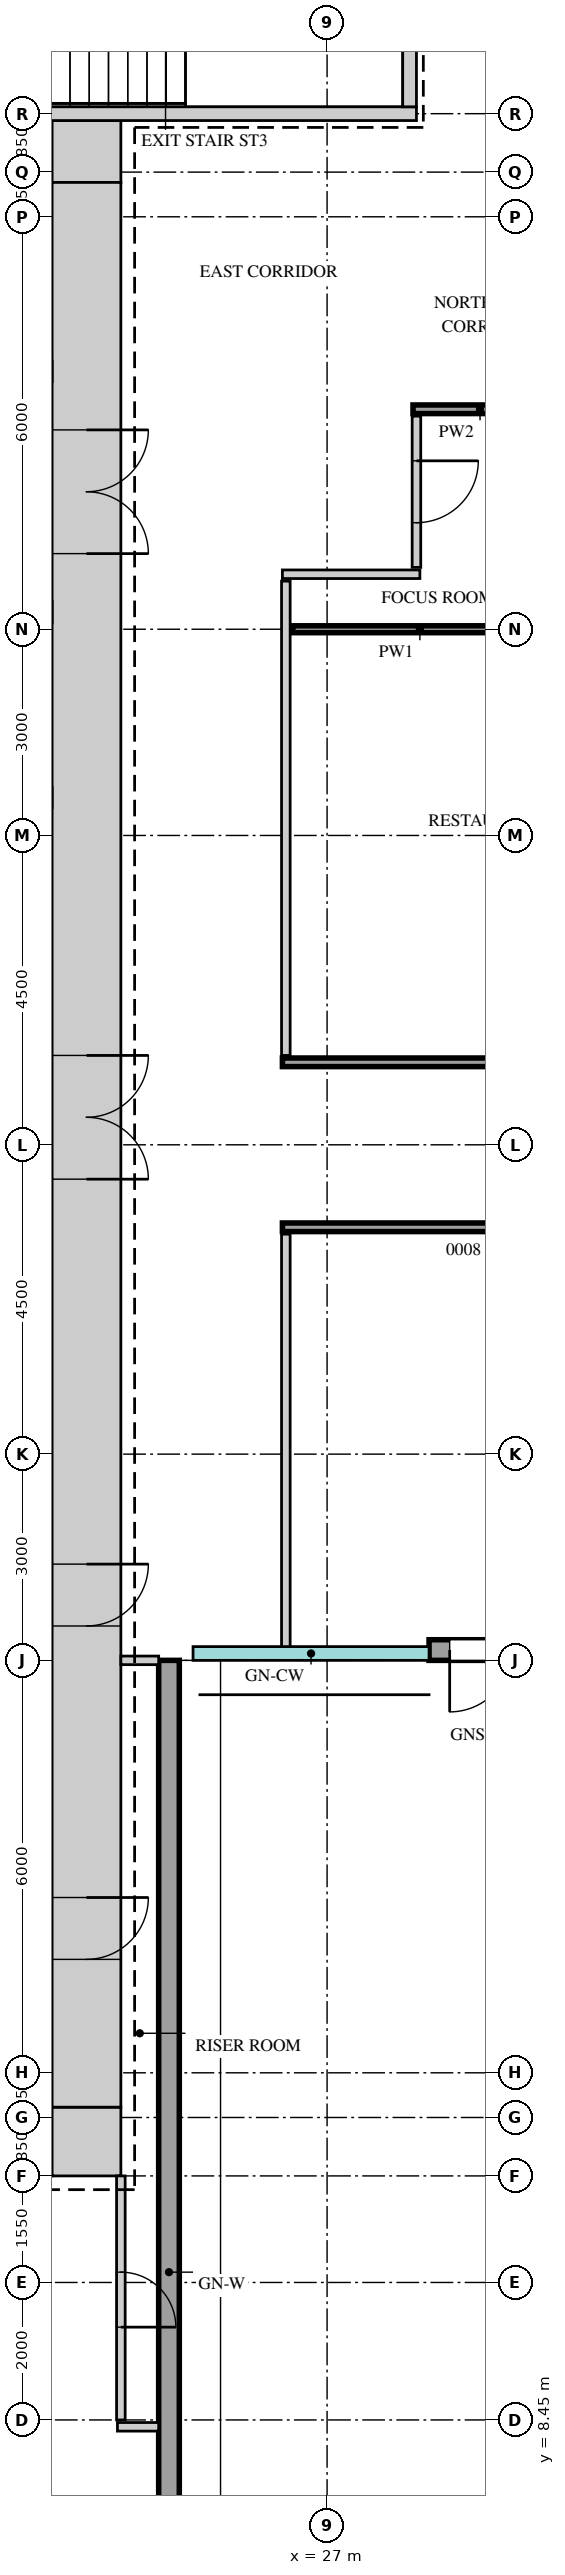
"""IFC4 building model, lengths in metres.
Left out: names, types, materials, properties, quantities, classifications, styles, units other than length and angle.
Written with IfcOpenShell. Run it as: python <this file> out.ifc"""

import sys

from ifc_helpers import new_model, si_unit, direction, frame, frame_2d, origin, place, context, subcontext, project, spatial, rectangle, extrude, source, transform, mapped, element, fill, save


model = new_model("IFC4")
c1 = context("Model", 3, precision=1e-05, world=origin(), true_north=direction((0.0, 1.0)))
c2 = subcontext(c1, "Body", "Model", "MODEL_VIEW")
j1 = project(units=[si_unit("LENGTHUNIT", "METRE"), si_unit("PLANEANGLEUNIT", "RADIAN")], contexts=[c1])
p1 = place(None, origin())
s1 = spatial("IfcSite", under=j1, at=p1, CompositionType="ELEMENT")
p2 = place(p1, origin())
s2 = spatial("IfcBuilding", under=s1, at=p2, CompositionType="ELEMENT")
p3 = place(p2, frame((0.0, 0.0, 158.7)))
s3 = spatial("IfcBuildingStorey", under=s2, at=p3, CompositionType="ELEMENT", Elevation=158.7)
m1 = source(origin(), c2, "Body", "SweptSolid", [
    extrude(rectangle(XDim=1.0, YDim=0.9, at=frame_2d((0.5, 0.0))), origin(), (0.0, 0.0, 1.0), 5.75),
])
p4 = place(p3, frame((23.0, 41.45, 0.0), z_axis=(0.0, 0.0, 1.0), x_axis=(1.0, 0.0, 0.0)))
e1 = element("IfcWall", 1, at=p4, inside=s3, PredefinedType="SHEAR", context=c2, shape_type="MappedRepresentation", body=[
    mapped(m1, transform((0.0, 0.0, 0.0))),
])
m2 = source(origin(), c2, "Body", "SweptSolid", [
    extrude(rectangle(XDim=1.0, YDim=1.0, at=frame_2d((0.5, 0.0))), origin(), (0.0, 0.0, 1.0), 5.75),
])
p5 = place(p3, frame((23.0, 12.5, 0.0), z_axis=(0.0, 0.0, 1.0), x_axis=(1.0, 0.0, 0.0)))
e2 = element("IfcWall", 2, at=p5, inside=s3, PredefinedType="SHEAR", context=c2, shape_type="MappedRepresentation", body=[
    mapped(m2, transform((0.0, 0.0, 0.0))),
])
m3 = source(origin(), c2, "Body", "SweptSolid", [
    extrude(rectangle(XDim=28.0, YDim=1.0, at=frame_2d((14.0, 0.0))), origin(), (0.0, 0.0, 1.0), 5.75),
])
p6 = place(p3, frame((23.5, 13.0, 0.0), z_axis=(0.0, 0.0, 1.0), x_axis=(0.0, 1.0, 0.0)))
e3 = element("IfcWall", 3, at=p6, inside=s3, PredefinedType="SHEAR", context=c2, shape_type="MappedRepresentation", body=[
    mapped(m3, transform((0.0, 0.0, 0.0))),
])
m4 = source(origin(), c2, "Body", "SweptSolid", [
    extrude(rectangle(XDim=1.8, YDim=2.1, at=frame_2d((0.9, 1.05))), frame((0.0, 0.51, 0.0), z_axis=(0.0, -1.0, 0.0), x_axis=(1.0, 0.0, 0.0)), (0.0, 0.0, 1.0), 1.02),
])
p7 = place(p6, frame((13.5, 0.0, 0.0)))
e4 = element("IfcOpeningElement", 4, at=p7, cuts=e3, PredefinedType="OPENING", context=c2, shape_type="MappedRepresentation", body=[
    mapped(m4, transform((0.0, 0.0, 0.0))),
])
p8 = place(p6, frame((22.6, 0.0, 0.0)))
e5 = element("IfcOpeningElement", 5, at=p8, cuts=e3, PredefinedType="OPENING", context=c2, shape_type="MappedRepresentation", body=[
    mapped(m4, transform((0.0, 0.0, 0.0))),
])
m5 = source(origin(), c2, "Body", "SweptSolid", [
    extrude(rectangle(XDim=0.9, YDim=2.1, at=frame_2d((0.45, 1.05))), frame((0.0, 0.51, 0.0), z_axis=(0.0, -1.0, 0.0), x_axis=(1.0, 0.0, 0.0)), (0.0, 0.0, 1.0), 1.02),
])
p9 = place(p6, frame((2.15, 0.0, 0.0)))
e6 = element("IfcOpeningElement", 6, at=p9, cuts=e3, PredefinedType="OPENING", context=c2, shape_type="MappedRepresentation", body=[
    mapped(m5, transform((0.0, 0.0, 0.0))),
])
p10 = place(p6, frame((7.0, 0.0, 0.0)))
e7 = element("IfcOpeningElement", 7, at=p10, cuts=e3, PredefinedType="OPENING", context=c2, shape_type="MappedRepresentation", body=[
    mapped(m5, transform((0.0, 0.0, 0.0))),
])
m6 = source(origin(), c2, "Body", "SweptSolid", [
    extrude(rectangle(XDim=7.1, YDim=0.2, at=frame_2d((3.55, 0.0))), origin(), (0.0, 0.0, 1.0), 5.75),
])
p11 = place(p3, frame((21.2, 42.0, 0.0), z_axis=(0.0, 0.0, 1.0), x_axis=(1.0, 0.0, 0.0)))
e8 = element("IfcWall", 8, at=p11, inside=s3, PredefinedType="SHEAR", context=c2, shape_type="MappedRepresentation", body=[
    mapped(m6, transform((0.0, 0.0, 0.0))),
])
m7 = source(origin(), c2, "Body", "SweptSolid", [
    extrude(rectangle(XDim=3.35, YDim=0.2, at=frame_2d((1.675, 0.0))), origin(), (0.0, 0.0, 1.0), 5.75),
])
p12 = place(p3, frame((28.2, 42.1, 0.0), z_axis=(0.0, 0.0, 1.0), x_axis=(0.0, 1.0, 0.0)))
e9 = element("IfcWall", 9, at=p12, inside=s3, PredefinedType="SHEAR", context=c2, shape_type="MappedRepresentation", body=[
    mapped(m7, transform((0.0, 0.0, 0.0))),
])
m8 = source(origin(), c2, "Body", "SweptSolid", [
    extrude(rectangle(XDim=17.8, YDim=0.3, at=frame_2d((8.9, 0.0))), origin(), (0.0, 0.0, 1.0), 5.55),
])
p13 = place(p3, frame((24.7, 1.7, 0.0), z_axis=(0.0, 0.0, 1.0), x_axis=(0.0, 1.0, 0.0)))
e10 = element("IfcWall", 10, at=p13, inside=s3, PredefinedType="SOLIDWALL", context=c2, shape_type="MappedRepresentation", body=[
    mapped(m8, transform((0.0, 0.0, 0.0))),
])
m9 = source(origin(), c2, "Body", "SweptSolid", [
    extrude(rectangle(XDim=2.4, YDim=0.3, at=frame_2d((1.2, 0.0))), origin(), (0.0, 0.0, 1.0), 5.55),
])
p14 = place(p3, frame((28.483, 19.65, 0.0), z_axis=(0.0, 0.0, 1.0), x_axis=(1.0, 0.0, 0.0)))
e11 = element("IfcWall", 11, at=p14, inside=s3, PredefinedType="SOLIDWALL", context=c2, shape_type="MappedRepresentation", body=[
    mapped(m9, transform((0.0, 0.0, 0.0))),
])
m10 = source(origin(), c2, "Body", "SweptSolid", [
    extrude(rectangle(XDim=1.8, YDim=2.4, at=frame_2d((0.9, 1.2))), frame((0.0, 0.16, 0.0), z_axis=(0.0, -1.0, 0.0), x_axis=(1.0, 0.0, 0.0)), (0.0, 0.0, 1.0), 0.32),
])
p15 = place(p14, frame((2.1, 0.0, 0.0), z_axis=(0.0, 0.0, 1.0), x_axis=(-1.0, 0.0, 0.0)))
e12 = element("IfcOpeningElement", 12, at=p15, cuts=e11, PredefinedType="OPENING", context=c2, shape_type="MappedRepresentation", body=[
    mapped(m10, transform((0.0, 0.0, 0.0))),
])
m11 = source(origin(), c2, "Body", "SweptSolid", [
    extrude(rectangle(XDim=0.6, YDim=0.125, at=frame_2d((0.3, 0.0))), origin(), (0.0, 0.0, 1.0), 5.75),
])
p16 = place(p3, frame((23.95, 8.35, 0.0), z_axis=(0.0, 0.0, 1.0), x_axis=(1.0, 0.0, 0.0)))
e13 = element("IfcWall", 13, at=p16, inside=s3, PredefinedType="PARTITIONING", context=c2, shape_type="MappedRepresentation", body=[
    mapped(m11, transform((0.0, 0.0, 0.0))),
])
m12 = source(origin(), c2, "Body", "SweptSolid", [
    extrude(rectangle(XDim=3.55, YDim=0.125, at=frame_2d((1.775, 0.0))), origin(), (0.0, 0.0, 1.0), 5.75),
])
p17 = place(p3, frame((24.0, 8.45, 0.0), z_axis=(0.0, 0.0, 1.0), x_axis=(0.0, 1.0, 0.0)))
e14 = element("IfcWall", 14, at=p17, inside=s3, PredefinedType="PARTITIONING", context=c2, shape_type="MappedRepresentation", body=[
    mapped(m12, transform((0.0, 0.0, 0.0))),
])
m13 = source(origin(), c2, "Body", "SweptSolid", [
    extrude(rectangle(XDim=0.8, YDim=2.1, at=frame_2d((0.4, 1.05))), frame((0.0, 0.073, 0.0), z_axis=(0.0, -1.0, 0.0), x_axis=(1.0, 0.0, 0.0)), (0.0, 0.0, 1.0), 0.145),
])
p18 = place(p17, frame((1.35, 0.0, 0.0)))
e15 = element("IfcOpeningElement", 15, at=p18, cuts=e14, PredefinedType="OPENING", context=c2, shape_type="MappedRepresentation", body=[
    mapped(m13, transform((0.0, 0.0, 0.0))),
])
m14 = source(origin(), c2, "Body", "SweptSolid", [
    extrude(rectangle(XDim=0.55, YDim=0.125, at=frame_2d((0.275, 0.0))), origin(), (0.0, 0.0, 1.0), 5.75),
])
p19 = place(p3, frame((24.0, 19.5, 0.0), z_axis=(0.0, 0.0, 1.0), x_axis=(1.0, 0.0, 0.0)))
e16 = element("IfcWall", 16, at=p19, inside=s3, PredefinedType="PARTITIONING", context=c2, shape_type="MappedRepresentation", body=[
    mapped(m14, transform((0.0, 0.0, 0.0))),
])
m15 = source(origin(), c2, "Body", "SweptSolid", [
    extrude(rectangle(XDim=6.05, YDim=0.125, at=frame_2d((3.025, 0.0))), origin(), (0.0, 0.0, 1.0), 5.75),
])
p20 = place(p3, frame((26.4, 19.65, 0.0), z_axis=(0.0, 0.0, 1.0), x_axis=(0.0, 1.0, 0.0)))
e17 = element("IfcWall", 17, at=p20, inside=s3, PredefinedType="PARTITIONING", context=c2, shape_type="MappedRepresentation", body=[
    mapped(m15, transform((0.0, 0.0, 0.0))),
])
m16 = source(origin(), c2, "Body", "SweptSolid", [
    extrude(rectangle(XDim=26.0, YDim=0.125, at=frame_2d((13.0, 0.0))), origin(), (0.0, 0.0, 1.0), 5.75),
])
p21 = place(p3, frame((26.35, 25.8, 0.0), z_axis=(0.0, 0.0, 1.0), x_axis=(1.0, 0.0, 0.0)))
e18 = element("IfcWall", 18, at=p21, inside=s3, PredefinedType="PARTITIONING", context=c2, shape_type="MappedRepresentation", body=[
    mapped(m16, transform((0.0, 0.0, 0.0))),
])
m17 = source(origin(), c2, "Body", "SweptSolid", [
    extrude(rectangle(XDim=1.2, YDim=2.1, at=frame_2d((0.6, 1.05))), frame((0.0, 0.073, 0.0), z_axis=(0.0, -1.0, 0.0), x_axis=(1.0, 0.0, 0.0)), (0.0, 0.0, 1.0), 0.145),
])
p22 = place(p21, frame((15.75, 0.0, 0.0)))
e19 = element("IfcOpeningElement", 19, at=p22, cuts=e18, PredefinedType="OPENING", context=c2, shape_type="MappedRepresentation", body=[
    mapped(m17, transform((0.0, 0.0, 0.0))),
])
p23 = place(p21, frame((22.3, 0.0, 0.0)))
e20 = element("IfcOpeningElement", 20, at=p23, cuts=e18, PredefinedType="OPENING", context=c2, shape_type="MappedRepresentation", body=[
    mapped(m17, transform((0.0, 0.0, 0.0))),
])
m18 = source(origin(), c2, "Body", "SweptSolid", [
    extrude(rectangle(XDim=0.9, YDim=2.1, at=frame_2d((0.45, 1.05))), frame((0.0, 0.073, 0.0), z_axis=(0.0, -1.0, 0.0), x_axis=(1.0, 0.0, 0.0)), (0.0, 0.0, 1.0), 0.145),
])
p24 = place(p21, frame((3.05, 0.0, 0.0)))
e21 = element("IfcOpeningElement", 21, at=p24, cuts=e18, PredefinedType="OPENING", context=c2, shape_type="MappedRepresentation", body=[
    mapped(m18, transform((0.0, 0.0, 0.0))),
])
p25 = place(p21, frame((9.4, 0.0, 0.0)))
e22 = element("IfcOpeningElement", 22, at=p25, cuts=e18, PredefinedType="OPENING", context=c2, shape_type="MappedRepresentation", body=[
    mapped(m18, transform((0.0, 0.0, 0.0))),
])
p26 = place(p3, frame((26.35, 28.2, 0.0), z_axis=(0.0, 0.0, 1.0), x_axis=(1.0, 0.0, 0.0)))
e23 = element("IfcWall", 23, at=p26, inside=s3, PredefinedType="PARTITIONING", context=c2, shape_type="MappedRepresentation", body=[
    mapped(m16, transform((0.0, 0.0, 0.0))),
])
p27 = place(p26, frame((19.75, 0.0, 0.0)))
e24 = element("IfcOpeningElement", 24, at=p27, cuts=e23, PredefinedType="OPENING", context=c2, shape_type="MappedRepresentation", body=[
    mapped(m18, transform((0.0, 0.0, 0.0))),
])
p28 = place(p26, frame((23.55, 0.0, 0.0)))
e25 = element("IfcOpeningElement", 25, at=p28, cuts=e23, PredefinedType="OPENING", context=c2, shape_type="MappedRepresentation", body=[
    mapped(m18, transform((0.0, 0.0, 0.0))),
])
p29 = place(p26, frame((4.25, 0.0, 0.0)))
e26 = element("IfcOpeningElement", 26, at=p29, cuts=e23, PredefinedType="OPENING", context=c2, shape_type="MappedRepresentation", body=[
    mapped(m17, transform((0.0, 0.0, 0.0))),
])
p30 = place(p26, frame((13.35, 0.0, 0.0)))
e27 = element("IfcOpeningElement", 27, at=p30, cuts=e23, PredefinedType="OPENING", context=c2, shape_type="MappedRepresentation", body=[
    mapped(m17, transform((0.0, 0.0, 0.0))),
])
m19 = source(origin(), c2, "Body", "SweptSolid", [
    extrude(rectangle(XDim=6.9, YDim=0.125, at=frame_2d((3.45, 0.0))), origin(), (0.0, 0.0, 1.0), 5.75),
])
p31 = place(p3, frame((26.4, 28.3, 0.0), z_axis=(0.0, 0.0, 1.0), x_axis=(0.0, 1.0, 0.0)))
e28 = element("IfcWall", 28, at=p31, inside=s3, PredefinedType="PARTITIONING", context=c2, shape_type="MappedRepresentation", body=[
    mapped(m19, transform((0.0, 0.0, 0.0))),
])
m20 = source(origin(), c2, "Body", "SweptSolid", [
    extrude(rectangle(XDim=3.7, YDim=0.1, at=frame_2d((1.85, 0.0))), origin(), (0.0, 0.0, 1.0), 5.75),
])
p32 = place(p3, frame((26.5, 34.5, 0.0), z_axis=(0.0, 0.0, 1.0), x_axis=(1.0, 0.0, 0.0)))
e29 = element("IfcWall", 29, at=p32, inside=s3, PredefinedType="PARTITIONING", context=c2, shape_type="MappedRepresentation", body=[
    mapped(m20, transform((0.0, 0.0, 0.0))),
])
m21 = source(origin(), c2, "Body", "SweptSolid", [
    extrude(rectangle(XDim=2.0, YDim=0.125, at=frame_2d((1.0, 0.0))), origin(), (0.0, 0.0, 1.0), 5.75),
])
p33 = place(p3, frame((26.35, 35.3, 0.0), z_axis=(0.0, 0.0, 1.0), x_axis=(1.0, 0.0, 0.0)))
e30 = element("IfcWall", 30, at=p33, inside=s3, PredefinedType="PARTITIONING", context=c2, shape_type="MappedRepresentation", body=[
    mapped(m21, transform((0.0, 0.0, 0.0))),
])
m22 = source(origin(), c2, "Body", "SweptSolid", [
    extrude(rectangle(XDim=2.2, YDim=0.125, at=frame_2d((1.1, 0.0))), origin(), (0.0, 0.0, 1.0), 5.75),
])
p34 = place(p3, frame((28.3, 35.4, 0.0), z_axis=(0.0, 0.0, 1.0), x_axis=(0.0, 1.0, 0.0)))
e31 = element("IfcWall", 31, at=p34, inside=s3, PredefinedType="PARTITIONING", context=c2, shape_type="MappedRepresentation", body=[
    mapped(m22, transform((0.0, 0.0, 0.0))),
])
p35 = place(p34, frame((0.65, 0.0, 0.0)))
e32 = element("IfcOpeningElement", 32, at=p35, cuts=e31, PredefinedType="OPENING", context=c2, shape_type="MappedRepresentation", body=[
    mapped(m18, transform((0.0, 0.0, 0.0))),
])
m23 = source(origin(), c2, "Body", "SweptSolid", [
    extrude(rectangle(XDim=1.95, YDim=0.125, at=frame_2d((0.975, 0.0))), origin(), (0.0, 0.0, 1.0), 5.75),
])
p36 = place(p3, frame((28.25, 37.7, 0.0), z_axis=(0.0, 0.0, 1.0), x_axis=(1.0, 0.0, 0.0)))
e33 = element("IfcWall", 33, at=p36, inside=s3, PredefinedType="PARTITIONING", context=c2, shape_type="MappedRepresentation", body=[
    mapped(m23, transform((0.0, 0.0, 0.0))),
])
m24 = source(origin(), c2, "Body", "SweptSolid", [
    extrude(rectangle(XDim=1.8, YDim=2.4, at=frame_2d((0.9, 1.2))), frame((0.0, 0.025, 0.0), z_axis=(0.0, -1.0, 0.0), x_axis=(1.0, 0.0, 0.0)), (0.0, 0.0, 1.0), 0.05),
])
p37 = place(p15, origin())
e34 = element("IfcDoor", 34, at=p37, inside=s3, OperationType="DOUBLE_DOOR_DOUBLE_SWING", PredefinedType="DOOR", context=c2, shape_type="MappedRepresentation", body=[
    mapped(m24, transform((0.0, 0.0, 0.0))),
])
fill(e12, e34)
m25 = source(origin(), c2, "Body", "SweptSolid", [
    extrude(rectangle(XDim=0.8, YDim=2.1, at=frame_2d((0.4, 1.05))), frame((0.0, 0.025, 0.0), z_axis=(0.0, -1.0, 0.0), x_axis=(1.0, 0.0, 0.0)), (0.0, 0.0, 1.0), 0.05),
])
p38 = place(p18, origin())
e35 = element("IfcDoor", 35, at=p38, inside=s3, OperationType="SINGLE_SWING_LEFT", PredefinedType="DOOR", context=c2, shape_type="MappedRepresentation", body=[
    mapped(m25, transform((0.0, 0.0, 0.0))),
])
fill(e15, e35)
m26 = source(origin(), c2, "Body", "SweptSolid", [
    extrude(rectangle(XDim=1.8, YDim=2.1, at=frame_2d((0.9, 1.05))), frame((0.0, 0.45, 0.0), z_axis=(0.0, -1.0, 0.0), x_axis=(1.0, 0.0, 0.0)), (0.0, 0.0, 1.0), 0.9),
])
p39 = place(p7, origin())
e36 = element("IfcDoor", 36, at=p39, inside=s3, OperationType="DOUBLE_DOOR_SINGLE_SWING", PredefinedType="DOOR", context=c2, shape_type="MappedRepresentation", body=[
    mapped(m26, transform((0.0, 0.0, 0.0))),
])
fill(e4, e36)
p40 = place(p8, origin())
e37 = element("IfcDoor", 37, at=p40, inside=s3, OperationType="DOUBLE_DOOR_SINGLE_SWING", PredefinedType="DOOR", context=c2, shape_type="MappedRepresentation", body=[
    mapped(m26, transform((0.0, 0.0, 0.0))),
])
fill(e5, e37)
m27 = source(origin(), c2, "Body", "SweptSolid", [
    extrude(rectangle(XDim=0.9, YDim=2.1, at=frame_2d((0.45, 1.05))), frame((0.0, 0.45, 0.0), z_axis=(0.0, -1.0, 0.0), x_axis=(1.0, 0.0, 0.0)), (0.0, 0.0, 1.0), 0.9),
])
p41 = place(p9, origin())
e38 = element("IfcDoor", 38, at=p41, inside=s3, OperationType="SINGLE_SWING_RIGHT", PredefinedType="DOOR", context=c2, shape_type="MappedRepresentation", body=[
    mapped(m27, transform((0.0, 0.0, 0.0))),
])
fill(e6, e38)
p42 = place(p10, origin())
e39 = element("IfcDoor", 39, at=p42, inside=s3, OperationType="SINGLE_SWING_RIGHT", PredefinedType="DOOR", context=c2, shape_type="MappedRepresentation", body=[
    mapped(m27, transform((0.0, 0.0, 0.0))),
])
fill(e7, e39)
m28 = source(origin(), c2, "Body", "SweptSolid", [
    extrude(rectangle(XDim=0.9, YDim=2.1, at=frame_2d((0.45, 1.05))), frame((0.0, 0.025, 0.0), z_axis=(0.0, -1.0, 0.0), x_axis=(1.0, 0.0, 0.0)), (0.0, 0.0, 1.0), 0.05),
])
p43 = place(p35, origin())
e40 = element("IfcDoor", 40, at=p43, inside=s3, OperationType="SINGLE_SWING_RIGHT", PredefinedType="DOOR", context=c2, shape_type="MappedRepresentation", body=[
    mapped(m28, transform((0.0, 0.0, 0.0))),
])
fill(e32, e40)
save(model, sys.argv[1])
